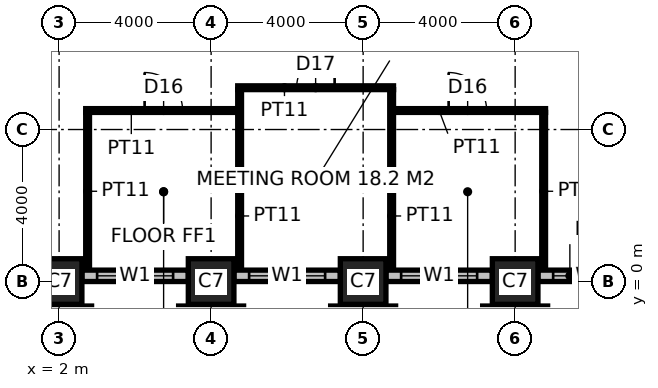
"""IFC4 building model, lengths in metres.
Left out: names, types, materials, properties, quantities, classifications, styles, units other than length and angle.
Written with IfcOpenShell. Run it as: python <this file> out.ifc"""

import sys

from ifc_helpers import new_model, si_unit, direction, frame, frame_2d, origin, origin_2d, place, context, subcontext, project, spatial, rectangle, hollow_rectangle, extrude, element, fill, save


model = new_model("IFC4")
c1 = context("Model", 3, precision=1e-05, world=origin(), true_north=direction((0.0, 1.0)))
c2 = subcontext(c1, "Body", "Model", "MODEL_VIEW")
j1 = project(units=[si_unit("LENGTHUNIT", "METRE"), si_unit("PLANEANGLEUNIT", "RADIAN")], contexts=[c1])
p1 = place(None, origin())
s1 = spatial("IfcSite", under=j1, at=p1, CompositionType="ELEMENT")
p2 = place(p1, origin())
s2 = spatial("IfcBuilding", under=s1, at=p2, CompositionType="ELEMENT")
p3 = place(p2, frame((0.0, 0.0, 63.0)))
s3 = spatial("IfcBuildingStorey", under=s2, at=p3, CompositionType="ELEMENT", Elevation=63.0)
for number, where, z_axis, x_axis in (
    (1, (2.0, 0.0, 0.0), (0.0, 0.0, 1.0), (1.0, 0.0, 0.0)),
    (2, (6.0, 0.0, 0.0), (0.0, 0.0, 1.0), (1.0, 0.0, 0.0)),
    (3, (10.0, 0.0, 0.0), (0.0, 0.0, 1.0), (1.0, 0.0, 0.0)),
    (4, (14.0, 0.0, 0.0), (0.0, 0.0, 1.0), (1.0, 0.0, 0.0)),
):
    element("IfcColumn", number, at=place(p3, frame(where, z_axis=z_axis, x_axis=x_axis)), inside=s3, PredefinedType="COLUMN", context=c2, shape_type="SweptSolid", body=[
        extrude(hollow_rectangle(XDim=1.2, YDim=1.2, WallThickness=0.1, at=origin_2d()), origin(), (0.0, 0.0, 1.0), 4.0),
    ])
p4 = place(p3, frame((2.7, 4.5, 0.0), z_axis=(0.0, 0.0, 1.0), x_axis=(1.0, 0.0, 0.0)))
e5 = element("IfcWall", 5, at=p4, inside=s3, PredefinedType="PARTITIONING", context=c2, shape_type="SweptSolid", body=[
    extrude(rectangle(XDim=4.0, YDim=0.1, at=frame_2d((2.0, 0.0))), origin(), (0.0, 0.0, 1.0), 3.85),
])
p5 = place(p4, frame((1.55, 0.0, 0.0)))
e6 = element("IfcOpeningElement", 6, at=p5, cuts=e5, PredefinedType="OPENING", context=c2, shape_type="SweptSolid", body=[
    extrude(rectangle(XDim=1.0, YDim=2.2, at=frame_2d((0.5, 1.1))), frame((0.0, 0.06, 0.0), z_axis=(0.0, -1.0, 0.0), x_axis=(1.0, 0.0, 0.0)), (0.0, 0.0, 1.0), 0.12),
])
p6 = place(p3, frame((10.8, 4.5, 0.0), z_axis=(0.0, 0.0, 1.0), x_axis=(1.0, 0.0, 0.0)))
e7 = element("IfcWall", 7, at=p6, inside=s3, PredefinedType="PARTITIONING", context=c2, shape_type="SweptSolid", body=[
    extrude(rectangle(XDim=4.0, YDim=0.1, at=frame_2d((2.0, 0.0))), origin(), (0.0, 0.0, 1.0), 3.85),
])
p7 = place(p6, frame((1.45, 0.0, 0.0)))
e8 = element("IfcOpeningElement", 8, at=p7, cuts=e7, PredefinedType="OPENING", context=c2, shape_type="SweptSolid", body=[
    extrude(rectangle(XDim=1.0, YDim=2.2, at=frame_2d((0.5, 1.1))), frame((0.0, 0.06, 0.0), z_axis=(0.0, -1.0, 0.0), x_axis=(1.0, 0.0, 0.0)), (0.0, 0.0, 1.0), 0.12),
])
p8 = place(p3, frame((6.7, 5.1, 0.0), z_axis=(0.0, 0.0, 1.0), x_axis=(1.0, 0.0, 0.0)))
e9 = element("IfcWall", 9, at=p8, inside=s3, PredefinedType="PARTITIONING", context=c2, shape_type="SweptSolid", body=[
    extrude(rectangle(XDim=4.1, YDim=0.1, at=frame_2d((2.05, 0.0))), origin(), (0.0, 0.0, 1.0), 3.85),
])
p9 = place(p8, frame((1.55, 0.0, 0.0)))
e10 = element("IfcOpeningElement", 10, at=p9, cuts=e9, PredefinedType="OPENING", context=c2, shape_type="SweptSolid", body=[
    extrude(rectangle(XDim=1.0, YDim=2.2, at=frame_2d((0.5, 1.1))), frame((0.0, 0.06, 0.0), z_axis=(0.0, -1.0, 0.0), x_axis=(1.0, 0.0, 0.0)), (0.0, 0.0, 1.0), 0.12),
])
p10 = place(p3, frame((2.75, 0.3, 0.0), z_axis=(0.0, 0.0, 1.0), x_axis=(0.0, 1.0, 0.0)))
e11 = element("IfcWall", 11, at=p10, inside=s3, PredefinedType="PARTITIONING", context=c2, shape_type="SweptSolid", body=[
    extrude(rectangle(XDim=4.15, YDim=0.1, at=frame_2d((2.075, 0.0))), origin(), (0.0, 0.0, 1.0), 3.85),
])
for number, where, z_axis, x_axis in (
    (12, (6.75, 0.3, 0.0), (0.0, 0.0, 1.0), (0.0, 1.0, 0.0)),
    (13, (10.75, 0.3, 0.0), (0.0, 0.0, 1.0), (0.0, 1.0, 0.0)),
):
    element("IfcWall", number, at=place(p3, frame(where, z_axis=z_axis, x_axis=x_axis)), inside=s3, PredefinedType="PARTITIONING", context=c2, shape_type="SweptSolid", body=[
        extrude(rectangle(XDim=4.75, YDim=0.1, at=frame_2d((2.375, 0.0))), origin(), (0.0, 0.0, 1.0), 3.85),
    ])
p11 = place(p3, frame((14.75, 0.3, 0.0), z_axis=(0.0, 0.0, 1.0), x_axis=(0.0, 1.0, 0.0)))
e14 = element("IfcWall", 14, at=p11, inside=s3, PredefinedType="PARTITIONING", context=c2, shape_type="SweptSolid", body=[
    extrude(rectangle(XDim=4.15, YDim=0.1, at=frame_2d((2.075, 0.0))), origin(), (0.0, 0.0, 1.0), 3.85),
])
p12 = place(p3, frame((2.6, 0.15, 0.0), z_axis=(0.0, 0.0, 1.0), x_axis=(1.0, 0.0, 0.0)))
e15 = element("IfcWall", 15, at=p12, inside=s3, PredefinedType="ELEMENTEDWALL", context=c2, shape_type="SweptSolid", body=[
    extrude(rectangle(XDim=2.8, YDim=0.3, at=frame_2d((1.4, 0.0))), origin(), (0.0, 0.0, 1.0), 2.85),
])
p13 = place(p12, frame((0.4, 0.0, 0.8)))
e16 = element("IfcOpeningElement", 16, at=p13, cuts=e15, PredefinedType="OPENING", context=c2, shape_type="SweptSolid", body=[
    extrude(rectangle(XDim=2.0, YDim=2.0, at=frame_2d((1.0, 1.0))), frame((0.0, 0.16, 0.0), z_axis=(0.0, -1.0, 0.0), x_axis=(1.0, 0.0, 0.0)), (0.0, 0.0, 1.0), 0.32),
])
p14 = place(p3, frame((6.6, 0.15, 0.0), z_axis=(0.0, 0.0, 1.0), x_axis=(1.0, 0.0, 0.0)))
e17 = element("IfcWall", 17, at=p14, inside=s3, PredefinedType="ELEMENTEDWALL", context=c2, shape_type="SweptSolid", body=[
    extrude(rectangle(XDim=2.8, YDim=0.3, at=frame_2d((1.4, 0.0))), origin(), (0.0, 0.0, 1.0), 2.85),
])
p15 = place(p14, frame((0.4, 0.0, 0.8)))
e18 = element("IfcOpeningElement", 18, at=p15, cuts=e17, PredefinedType="OPENING", context=c2, shape_type="SweptSolid", body=[
    extrude(rectangle(XDim=2.0, YDim=2.0, at=frame_2d((1.0, 1.0))), frame((0.0, 0.16, 0.0), z_axis=(0.0, -1.0, 0.0), x_axis=(1.0, 0.0, 0.0)), (0.0, 0.0, 1.0), 0.32),
])
p16 = place(p3, frame((10.6, 0.15, 0.0), z_axis=(0.0, 0.0, 1.0), x_axis=(1.0, 0.0, 0.0)))
e19 = element("IfcWall", 19, at=p16, inside=s3, PredefinedType="ELEMENTEDWALL", context=c2, shape_type="SweptSolid", body=[
    extrude(rectangle(XDim=2.8, YDim=0.3, at=frame_2d((1.4, 0.0))), origin(), (0.0, 0.0, 1.0), 2.85),
])
p17 = place(p16, frame((0.4, 0.0, 0.8)))
e20 = element("IfcOpeningElement", 20, at=p17, cuts=e19, PredefinedType="OPENING", context=c2, shape_type="SweptSolid", body=[
    extrude(rectangle(XDim=2.0, YDim=2.0, at=frame_2d((1.0, 1.0))), frame((0.0, 0.16, 0.0), z_axis=(0.0, -1.0, 0.0), x_axis=(1.0, 0.0, 0.0)), (0.0, 0.0, 1.0), 0.32),
])
p18 = place(p3, frame((14.6, 0.15, 0.0), z_axis=(0.0, 0.0, 1.0), x_axis=(1.0, 0.0, 0.0)))
e21 = element("IfcWall", 21, at=p18, inside=s3, PredefinedType="ELEMENTEDWALL", context=c2, shape_type="SweptSolid", body=[
    extrude(rectangle(XDim=2.8, YDim=0.3, at=frame_2d((1.4, 0.0))), origin(), (0.0, 0.0, 1.0), 2.85),
])
p19 = place(p18, frame((0.4, 0.0, 0.8)))
e22 = element("IfcOpeningElement", 22, at=p19, cuts=e21, PredefinedType="OPENING", context=c2, shape_type="SweptSolid", body=[
    extrude(rectangle(XDim=2.0, YDim=2.0, at=frame_2d((1.0, 1.0))), frame((0.0, 0.16, 0.0), z_axis=(0.0, -1.0, 0.0), x_axis=(1.0, 0.0, 0.0)), (0.0, 0.0, 1.0), 0.32),
])
p20 = place(p5, origin())
e23 = element("IfcDoor", 23, at=p20, inside=s3, OperationType="SINGLE_SWING_LEFT", PredefinedType="DOOR", context=c2, shape_type="SweptSolid", body=[
    extrude(rectangle(XDim=1.0, YDim=2.2, at=frame_2d((0.5, 1.1))), frame((0.0, 0.025, 0.0), z_axis=(0.0, -1.0, 0.0), x_axis=(1.0, 0.0, 0.0)), (0.0, 0.0, 1.0), 0.05),
])
fill(e6, e23)
p21 = place(p9, origin())
e24 = element("IfcDoor", 24, at=p21, inside=s3, OperationType="SINGLE_SWING_RIGHT", PredefinedType="DOOR", context=c2, shape_type="SweptSolid", body=[
    extrude(rectangle(XDim=1.0, YDim=2.2, at=frame_2d((0.5, 1.1))), frame((0.0, 0.025, 0.0), z_axis=(0.0, -1.0, 0.0), x_axis=(1.0, 0.0, 0.0)), (0.0, 0.0, 1.0), 0.05),
])
fill(e10, e24)
p22 = place(p7, origin())
e25 = element("IfcDoor", 25, at=p22, inside=s3, OperationType="SINGLE_SWING_LEFT", PredefinedType="DOOR", context=c2, shape_type="SweptSolid", body=[
    extrude(rectangle(XDim=1.0, YDim=2.2, at=frame_2d((0.5, 1.1))), frame((0.0, 0.025, 0.0), z_axis=(0.0, -1.0, 0.0), x_axis=(1.0, 0.0, 0.0)), (0.0, 0.0, 1.0), 0.05),
])
fill(e8, e25)
p23 = place(p13, origin())
e26 = element("IfcWindow", 26, at=p23, inside=s3, PartitioningType="SINGLE_PANEL", PredefinedType="WINDOW", context=c2, shape_type="SweptSolid", body=[
    extrude(rectangle(XDim=2.0, YDim=2.0, at=frame_2d((1.0, 1.0))), frame((0.0, 0.03, 0.0), z_axis=(0.0, -1.0, 0.0), x_axis=(1.0, 0.0, 0.0)), (0.0, 0.0, 1.0), 0.06),
])
fill(e16, e26)
p24 = place(p15, origin())
e27 = element("IfcWindow", 27, at=p24, inside=s3, PartitioningType="SINGLE_PANEL", PredefinedType="WINDOW", context=c2, shape_type="SweptSolid", body=[
    extrude(rectangle(XDim=2.0, YDim=2.0, at=frame_2d((1.0, 1.0))), frame((0.0, 0.03, 0.0), z_axis=(0.0, -1.0, 0.0), x_axis=(1.0, 0.0, 0.0)), (0.0, 0.0, 1.0), 0.06),
])
fill(e18, e27)
p25 = place(p17, origin())
e28 = element("IfcWindow", 28, at=p25, inside=s3, PartitioningType="SINGLE_PANEL", PredefinedType="WINDOW", context=c2, shape_type="SweptSolid", body=[
    extrude(rectangle(XDim=2.0, YDim=2.0, at=frame_2d((1.0, 1.0))), frame((0.0, 0.03, 0.0), z_axis=(0.0, -1.0, 0.0), x_axis=(1.0, 0.0, 0.0)), (0.0, 0.0, 1.0), 0.06),
])
fill(e20, e28)
p26 = place(p19, origin())
e29 = element("IfcWindow", 29, at=p26, inside=s3, PartitioningType="SINGLE_PANEL", PredefinedType="WINDOW", context=c2, shape_type="SweptSolid", body=[
    extrude(rectangle(XDim=2.0, YDim=2.0, at=frame_2d((1.0, 1.0))), frame((0.0, 0.03, 0.0), z_axis=(0.0, -1.0, 0.0), x_axis=(1.0, 0.0, 0.0)), (0.0, 0.0, 1.0), 0.06),
])
fill(e22, e29)
save(model, sys.argv[1])
